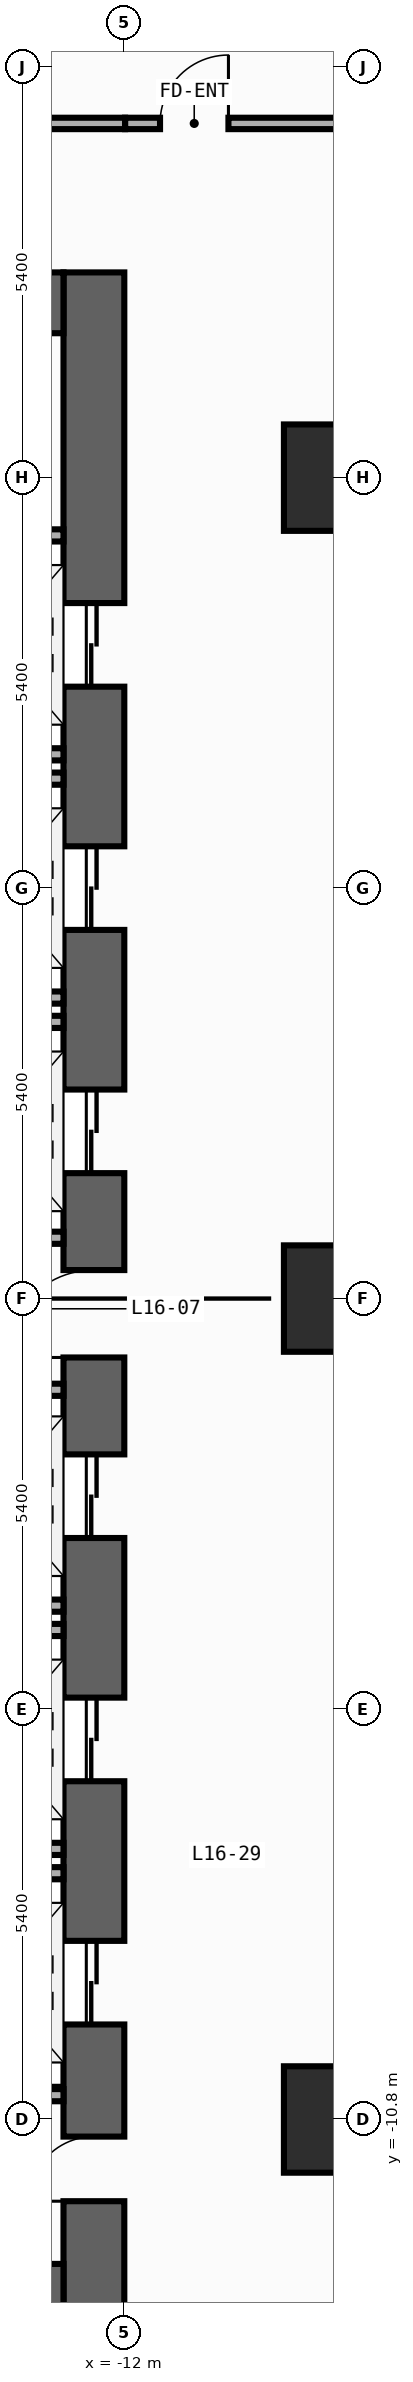
"""IFC4 building model, lengths in metres.
Left out: names, types, materials, properties, quantities, classifications, styles, units other than length and angle.
Written with IfcOpenShell. Run it as: python <this file> out.ifc"""

import sys

from ifc_helpers import new_model, si_unit, direction, frame, frame_2d, origin, origin_2d, place, context, subcontext, project, spatial, rectangle, extrude, element, fill, save


model = new_model("IFC4")
c1 = context("Model", 3, precision=1e-05, world=origin(), true_north=direction((0.0, 1.0)))
c2 = subcontext(c1, "Body", "Model", "MODEL_VIEW")
j1 = project(units=[si_unit("LENGTHUNIT", "METRE"), si_unit("PLANEANGLEUNIT", "RADIAN")], contexts=[c1])
p1 = place(None, origin())
s1 = spatial("IfcSite", under=j1, at=p1, CompositionType="ELEMENT")
p2 = place(p1, origin())
s2 = spatial("IfcBuilding", under=s1, at=p2, CompositionType="ELEMENT")
p3 = place(p2, frame((0.0, 0.0, 68.0)))
s3 = spatial("IfcBuildingStorey", under=s2, at=p3, CompositionType="ELEMENT", Elevation=68.0)
p4 = place(p3, frame((-12.4, -13.5, 0.0), z_axis=(0.0, 0.0, 1.0), x_axis=(0.0, 1.0, 0.0)))
e1 = element("IfcWall", 1, at=p4, inside=s3, PredefinedType="SHEAR", context=c2, shape_type="SweptSolid", body=[
    extrude(rectangle(XDim=27.0, YDim=0.8, at=frame_2d((13.5, 0.0))), origin(), (0.0, 0.0, 1.0), 3.94),
])
p5 = place(p4, frame((21.55, 0.0, 0.0)))
e2 = element("IfcOpeningElement", 2, at=p5, cuts=e1, PredefinedType="OPENING", context=c2, shape_type="SweptSolid", body=[
    extrude(rectangle(XDim=1.1, YDim=2.2, at=frame_2d((0.55, 1.1))), frame((0.0, 0.41, 0.0), z_axis=(0.0, -1.0, 0.0), x_axis=(1.0, 0.0, 0.0)), (0.0, 0.0, 1.0), 0.82),
])
p6 = place(p4, frame((18.35, 0.0, 0.0)))
e3 = element("IfcOpeningElement", 3, at=p6, cuts=e1, PredefinedType="OPENING", context=c2, shape_type="SweptSolid", body=[
    extrude(rectangle(XDim=1.1, YDim=2.2, at=frame_2d((0.55, 1.1))), frame((0.0, 0.41, 0.0), z_axis=(0.0, -1.0, 0.0), x_axis=(1.0, 0.0, 0.0)), (0.0, 0.0, 1.0), 0.82),
])
p7 = place(p4, frame((15.15, 0.0, 0.0)))
e4 = element("IfcOpeningElement", 4, at=p7, cuts=e1, PredefinedType="OPENING", context=c2, shape_type="SweptSolid", body=[
    extrude(rectangle(XDim=1.1, YDim=2.2, at=frame_2d((0.55, 1.1))), frame((0.0, 0.41, 0.0), z_axis=(0.0, -1.0, 0.0), x_axis=(1.0, 0.0, 0.0)), (0.0, 0.0, 1.0), 0.82),
])
p8 = place(p4, frame((10.35, 0.0, 0.0)))
e5 = element("IfcOpeningElement", 5, at=p8, cuts=e1, PredefinedType="OPENING", context=c2, shape_type="SweptSolid", body=[
    extrude(rectangle(XDim=1.1, YDim=2.2, at=frame_2d((0.55, 1.1))), frame((0.0, 0.41, 0.0), z_axis=(0.0, -1.0, 0.0), x_axis=(1.0, 0.0, 0.0)), (0.0, 0.0, 1.0), 0.82),
])
p9 = place(p4, frame((7.15, 0.0, 0.0)))
e6 = element("IfcOpeningElement", 6, at=p9, cuts=e1, PredefinedType="OPENING", context=c2, shape_type="SweptSolid", body=[
    extrude(rectangle(XDim=1.1, YDim=2.2, at=frame_2d((0.55, 1.1))), frame((0.0, 0.41, 0.0), z_axis=(0.0, -1.0, 0.0), x_axis=(1.0, 0.0, 0.0)), (0.0, 0.0, 1.0), 0.82),
])
p10 = place(p4, frame((3.95, 0.0, 0.0)))
e7 = element("IfcOpeningElement", 7, at=p10, cuts=e1, PredefinedType="OPENING", context=c2, shape_type="SweptSolid", body=[
    extrude(rectangle(XDim=1.1, YDim=2.2, at=frame_2d((0.55, 1.1))), frame((0.0, 0.41, 0.0), z_axis=(0.0, -1.0, 0.0), x_axis=(1.0, 0.0, 0.0)), (0.0, 0.0, 1.0), 0.82),
])
p11 = place(p4, frame((12.725, 0.0, 0.0)))
e8 = element("IfcOpeningElement", 8, at=p11, cuts=e1, PredefinedType="OPENING", context=c2, shape_type="SweptSolid", body=[
    extrude(rectangle(XDim=1.15, YDim=2.2, at=frame_2d((0.575, 1.1))), frame((0.0, 0.41, 0.0), z_axis=(0.0, -1.0, 0.0), x_axis=(1.0, 0.0, 0.0)), (0.0, 0.0, 1.0), 0.82),
])
p12 = place(p4, frame((1.625, 0.0, 0.0)))
e9 = element("IfcOpeningElement", 9, at=p12, cuts=e1, PredefinedType="OPENING", context=c2, shape_type="SweptSolid", body=[
    extrude(rectangle(XDim=0.85, YDim=2.1, at=frame_2d((0.425, 1.05))), frame((0.0, 0.41, 0.0), z_axis=(0.0, -1.0, 0.0), x_axis=(1.0, 0.0, 0.0)), (0.0, 0.0, 1.0), 0.82),
])
for number, where, z_axis, x_axis in (
    (10, (-19.6, -13.1, 0.0), (0.0, 0.0, 1.0), (1.0, 0.0, 0.0)),
    (11, (-19.6, 13.1, 0.0), (0.0, 0.0, 1.0), (1.0, 0.0, 0.0)),
):
    element("IfcWall", number, at=place(p3, frame(where, z_axis=z_axis, x_axis=x_axis)), inside=s3, PredefinedType="SHEAR", context=c2, shape_type="SweptSolid", body=[
        extrude(rectangle(XDim=6.8, YDim=0.8, at=frame_2d((3.4, 0.0))), origin(), (0.0, 0.0, 1.0), 3.94),
    ])
for number, where, z_axis, x_axis in (
    (12, (-9.2, -10.8, 0.0), (0.0, 0.0, 1.0), (1.0, 0.0, 0.0)),
    (13, (-9.2, 0.0, 0.0), (0.0, 0.0, 1.0), (1.0, 0.0, 0.0)),
    (14, (-9.2, 10.8, 0.0), (0.0, 0.0, 1.0), (1.0, 0.0, 0.0)),
):
    element("IfcColumn", number, at=place(p3, frame(where, z_axis=z_axis, x_axis=x_axis)), inside=s3, PredefinedType="COLUMN", context=c2, shape_type="SweptSolid", body=[
        extrude(rectangle(XDim=1.4, YDim=1.4, at=origin_2d()), origin(), (0.0, 0.0, 1.0), 4.2),
    ])
for number, where, z_axis, x_axis in (
    (15, (-14.99, 7.16, 0.0), (0.0, 0.0, 1.0), (1.0, 0.0, 0.0)),
    (16, (-14.99, 10.04, 0.0), (0.0, 0.0, 1.0), (1.0, 0.0, 0.0)),
    (17, (-14.99, 3.96, 0.0), (0.0, 0.0, 1.0), (1.0, 0.0, 0.0)),
    (18, (-14.99, 6.84, 0.0), (0.0, 0.0, 1.0), (1.0, 0.0, 0.0)),
    (19, (-14.99, 3.64, 0.0), (0.0, 0.0, 1.0), (1.0, 0.0, 0.0)),
    (20, (-14.99, -4.04, 0.0), (0.0, 0.0, 1.0), (1.0, 0.0, 0.0)),
    (21, (-14.99, -7.24, 0.0), (0.0, 0.0, 1.0), (1.0, 0.0, 0.0)),
    (22, (-14.99, -4.36, 0.0), (0.0, 0.0, 1.0), (1.0, 0.0, 0.0)),
    (23, (-14.99, -7.56, 0.0), (0.0, 0.0, 1.0), (1.0, 0.0, 0.0)),
):
    element("IfcWall", number, at=place(p3, frame(where, z_axis=z_axis, x_axis=x_axis)), inside=s3, PredefinedType="STANDARD", context=c2, shape_type="SweptSolid", body=[
        extrude(rectangle(XDim=2.19, YDim=0.16, at=frame_2d((1.095, 0.0))), origin(), (0.0, 0.0, 1.0), 3.94),
    ])
for number, where, z_axis, x_axis in (
    (24, (-15.4, 0.8, 0.0), (0.0, 0.0, 1.0), (1.0, 0.0, 0.0)),
    (25, (-15.4, -1.2, 0.0), (0.0, 0.0, 1.0), (1.0, 0.0, 0.0)),
    (26, (-15.4, -10.48, 0.0), (0.0, 0.0, 1.0), (1.0, 0.0, 0.0)),
):
    element("IfcWall", number, at=place(p3, frame(where, z_axis=z_axis, x_axis=x_axis)), inside=s3, PredefinedType="STANDARD", context=c2, shape_type="SweptSolid", body=[
        extrude(rectangle(XDim=2.6, YDim=0.16, at=frame_2d((1.3, 0.0))), origin(), (0.0, 0.0, 1.0), 3.94),
    ])
p13 = place(p3, frame((-11.99, 15.46, 0.0), z_axis=(0.0, 0.0, 1.0), x_axis=(1.0, 0.0, 0.0)))
e27 = element("IfcWall", 27, at=p13, inside=s3, PredefinedType="PARTITIONING", context=c2, shape_type="SweptSolid", body=[
    extrude(rectangle(XDim=3.15, YDim=0.15, at=frame_2d((1.575, 0.0))), origin(), (0.0, 0.0, 1.0), 3.94),
])
p14 = place(p13, frame((0.46, 0.0, 0.0)))
e28 = element("IfcOpeningElement", 28, at=p14, cuts=e27, PredefinedType="OPENING", context=c2, shape_type="SweptSolid", body=[
    extrude(rectangle(XDim=0.9, YDim=2.15, at=frame_2d((0.45, 1.075))), frame((0.0, 0.085, 0.0), z_axis=(0.0, -1.0, 0.0), x_axis=(1.0, 0.0, 0.0)), (0.0, 0.0, 1.0), 0.17),
])
p15 = place(p3, frame((-20.64, 15.46, 0.0), z_axis=(0.0, 0.0, 1.0), x_axis=(1.0, 0.0, 0.0)))
e29 = element("IfcWall", 29, at=p15, inside=s3, PredefinedType="PARTITIONING", context=c2, shape_type="SweptSolid", body=[
    extrude(rectangle(XDim=8.65, YDim=0.15, at=frame_2d((4.325, 0.0))), origin(), (0.0, 0.0, 1.0), 3.94),
])
p16 = place(p15, frame((2.871, 0.0, 0.0)))
e30 = element("IfcOpeningElement", 30, at=p16, cuts=e29, PredefinedType="OPENING", context=c2, shape_type="SweptSolid", body=[
    extrude(rectangle(XDim=0.9, YDim=2.15, at=frame_2d((0.45, 1.075))), frame((0.0, 0.085, 0.0), z_axis=(0.0, -1.0, 0.0), x_axis=(1.0, 0.0, 0.0)), (0.0, 0.0, 1.0), 0.17),
])
p17 = place(p5, origin())
e31 = element("IfcDoor", 31, at=p17, inside=s3, OperationType="DOUBLE_DOOR_SLIDING", PredefinedType="DOOR", context=c2, shape_type="SweptSolid", body=[
    extrude(rectangle(XDim=1.1, YDim=2.2, at=frame_2d((0.55, 1.1))), frame((0.0, 0.025, 0.0), z_axis=(0.0, -1.0, 0.0), x_axis=(1.0, 0.0, 0.0)), (0.0, 0.0, 1.0), 0.05),
])
fill(e2, e31)
p18 = place(p6, origin())
e32 = element("IfcDoor", 32, at=p18, inside=s3, OperationType="DOUBLE_DOOR_SLIDING", PredefinedType="DOOR", context=c2, shape_type="SweptSolid", body=[
    extrude(rectangle(XDim=1.1, YDim=2.2, at=frame_2d((0.55, 1.1))), frame((0.0, 0.025, 0.0), z_axis=(0.0, -1.0, 0.0), x_axis=(1.0, 0.0, 0.0)), (0.0, 0.0, 1.0), 0.05),
])
fill(e3, e32)
p19 = place(p7, origin())
e33 = element("IfcDoor", 33, at=p19, inside=s3, OperationType="DOUBLE_DOOR_SLIDING", PredefinedType="DOOR", context=c2, shape_type="SweptSolid", body=[
    extrude(rectangle(XDim=1.1, YDim=2.2, at=frame_2d((0.55, 1.1))), frame((0.0, 0.025, 0.0), z_axis=(0.0, -1.0, 0.0), x_axis=(1.0, 0.0, 0.0)), (0.0, 0.0, 1.0), 0.05),
])
fill(e4, e33)
p20 = place(p8, origin())
e34 = element("IfcDoor", 34, at=p20, inside=s3, OperationType="DOUBLE_DOOR_SLIDING", PredefinedType="DOOR", context=c2, shape_type="SweptSolid", body=[
    extrude(rectangle(XDim=1.1, YDim=2.2, at=frame_2d((0.55, 1.1))), frame((0.0, 0.025, 0.0), z_axis=(0.0, -1.0, 0.0), x_axis=(1.0, 0.0, 0.0)), (0.0, 0.0, 1.0), 0.05),
])
fill(e5, e34)
p21 = place(p9, origin())
e35 = element("IfcDoor", 35, at=p21, inside=s3, OperationType="DOUBLE_DOOR_SLIDING", PredefinedType="DOOR", context=c2, shape_type="SweptSolid", body=[
    extrude(rectangle(XDim=1.1, YDim=2.2, at=frame_2d((0.55, 1.1))), frame((0.0, 0.025, 0.0), z_axis=(0.0, -1.0, 0.0), x_axis=(1.0, 0.0, 0.0)), (0.0, 0.0, 1.0), 0.05),
])
fill(e6, e35)
p22 = place(p10, origin())
e36 = element("IfcDoor", 36, at=p22, inside=s3, OperationType="DOUBLE_DOOR_SLIDING", PredefinedType="DOOR", context=c2, shape_type="SweptSolid", body=[
    extrude(rectangle(XDim=1.1, YDim=2.2, at=frame_2d((0.55, 1.1))), frame((0.0, 0.025, 0.0), z_axis=(0.0, -1.0, 0.0), x_axis=(1.0, 0.0, 0.0)), (0.0, 0.0, 1.0), 0.05),
])
fill(e7, e36)
p23 = place(p11, origin())
e37 = element("IfcDoor", 37, at=p23, inside=s3, OperationType="SINGLE_SWING_LEFT", PredefinedType="DOOR", context=c2, shape_type="SweptSolid", body=[
    extrude(rectangle(XDim=1.15, YDim=2.2, at=frame_2d((0.575, 1.1))), frame((0.0, 0.025, 0.0), z_axis=(0.0, -1.0, 0.0), x_axis=(1.0, 0.0, 0.0)), (0.0, 0.0, 1.0), 0.05),
])
fill(e8, e37)
p24 = place(p12, origin())
e38 = element("IfcDoor", 38, at=p24, inside=s3, OperationType="SINGLE_SWING_LEFT", PredefinedType="DOOR", context=c2, shape_type="SweptSolid", body=[
    extrude(rectangle(XDim=0.85, YDim=2.1, at=frame_2d((0.425, 1.05))), frame((0.0, 0.025, 0.0), z_axis=(0.0, -1.0, 0.0), x_axis=(1.0, 0.0, 0.0)), (0.0, 0.0, 1.0), 0.05),
])
fill(e9, e38)
p25 = place(p14, origin())
e39 = element("IfcDoor", 39, at=p25, inside=s3, OperationType="SINGLE_SWING_RIGHT", PredefinedType="DOOR", context=c2, shape_type="SweptSolid", body=[
    extrude(rectangle(XDim=0.9, YDim=2.15, at=frame_2d((0.45, 1.075))), frame((0.0, 0.025, 0.0), z_axis=(0.0, -1.0, 0.0), x_axis=(1.0, 0.0, 0.0)), (0.0, 0.0, 1.0), 0.05),
])
fill(e28, e39)
save(model, sys.argv[1])
